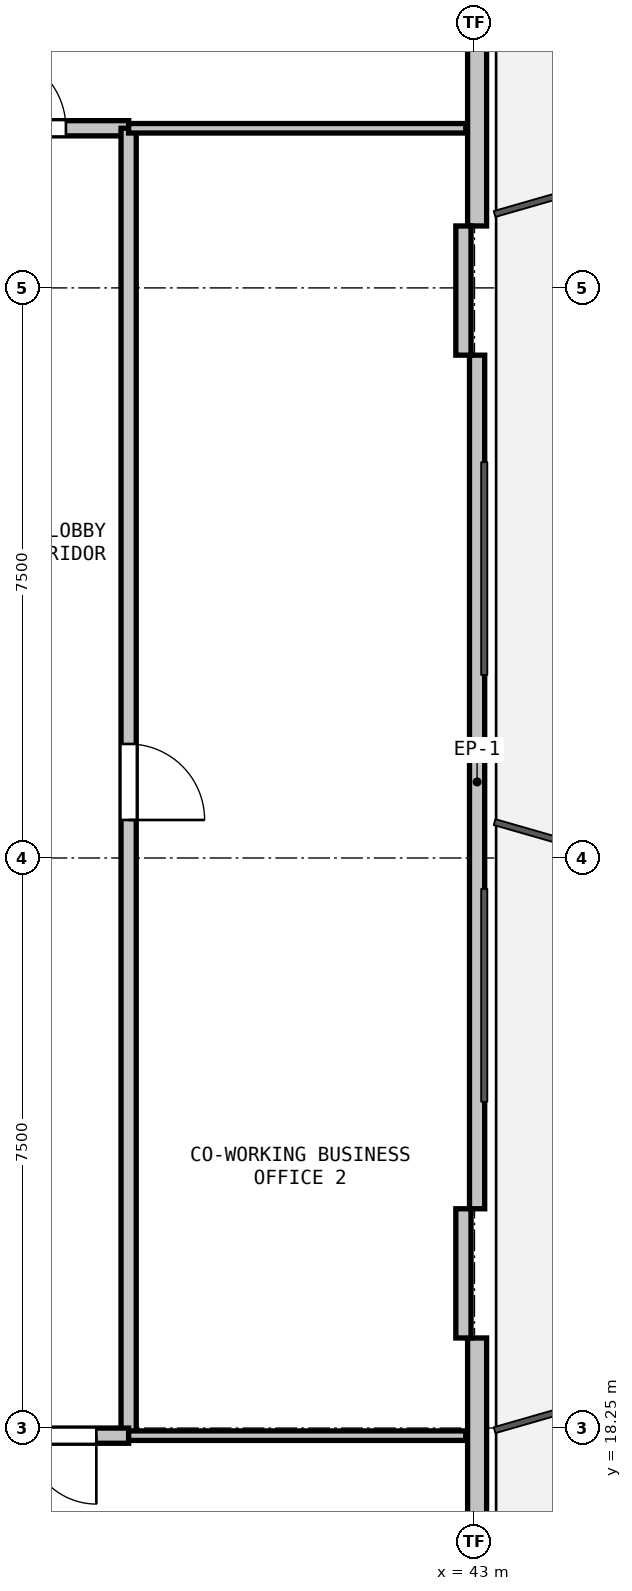
"""IFC4 building model, lengths in metres.
Left out: names, types, materials, properties, quantities, classifications, styles, units other than length and angle.
Written with IfcOpenShell. Run it as: python <this file> out.ifc"""

import sys

from ifc_helpers import new_model, si_unit, direction, frame, frame_2d, origin, place, context, subcontext, project, spatial, rectangle, extrude, element, fill, save


model = new_model("IFC4")
c1 = context("Model", 3, precision=1e-05, world=origin(), true_north=direction((0.0, 1.0)))
c2 = subcontext(c1, "Body", "Model", "MODEL_VIEW")
j1 = project(units=[si_unit("LENGTHUNIT", "METRE"), si_unit("PLANEANGLEUNIT", "RADIAN")], contexts=[c1])
p1 = place(None, origin())
s1 = spatial("IfcSite", under=j1, at=p1, CompositionType="ELEMENT")
p2 = place(p1, origin())
s2 = spatial("IfcBuilding", under=s1, at=p2, CompositionType="ELEMENT")
p3 = place(p2, frame((0.0, 0.0, 116.4)))
s3 = spatial("IfcBuildingStorey", under=s2, at=p3, CompositionType="ELEMENT", Elevation=116.4)
p4 = place(p3, frame((43.035, 45.994, 0.0), z_axis=(0.0, 0.0, 1.0), x_axis=(0.0, -1.0, 0.0)))
e1 = element("IfcWall", 1, at=p4, inside=s3, PredefinedType="SOLIDWALL", context=c2, shape_type="SweptSolid", body=[
    extrude(rectangle(XDim=11.93, YDim=0.25, at=frame_2d((5.965, 0.0))), origin(), (0.0, 0.0, 1.0), 2.945),
])
p5 = place(p4, frame((7.616, 0.0, 0.0)))
e2 = element("IfcOpeningElement", 2, at=p5, cuts=e1, PredefinedType="OPENING", context=c2, shape_type="SweptSolid", body=[
    extrude(rectangle(XDim=1.1, YDim=2.1, at=frame_2d((0.55, 1.05))), frame((0.0, 0.135, 0.0), z_axis=(0.0, -1.0, 0.0), x_axis=(1.0, 0.0, 0.0)), (0.0, 0.0, 1.0), 0.27),
])
p6 = place(p3, frame((43.035, 32.365, 0.0), z_axis=(0.0, 0.0, 1.0), x_axis=(0.0, -1.0, 0.0)))
e3 = element("IfcWall", 3, at=p6, inside=s3, PredefinedType="PARAPET", context=c2, shape_type="SweptSolid", body=[
    extrude(rectangle(XDim=11.229, YDim=0.2, at=frame_2d((5.615, 0.0))), origin(), (0.0, 0.0, 1.0), 0.2),
])
p7 = place(p3, frame((43.035, 19.435, 0.0), z_axis=(0.0, 0.0, 1.0), x_axis=(0.0, -1.0, 0.0)))
e4 = element("IfcWall", 4, at=p7, inside=s3, PredefinedType="SOLIDWALL", context=c2, shape_type="SweptSolid", body=[
    extrude(rectangle(XDim=11.93, YDim=0.25, at=frame_2d((5.965, 0.0))), origin(), (0.0, 0.0, 1.0), 2.945),
])
p8 = place(p7, frame((2.668, 0.0, 0.9)))
e5 = element("IfcOpeningElement", 5, at=p8, cuts=e4, PredefinedType="OPENING", context=c2, shape_type="SweptSolid", body=[
    extrude(rectangle(XDim=2.4, YDim=1.96, at=frame_2d((1.2, 0.98))), frame((0.0, 0.135, 0.0), z_axis=(0.0, -1.0, 0.0), x_axis=(1.0, 0.0, 0.0)), (0.0, 0.0, 1.0), 0.27),
])
for number, where, z_axis, x_axis in (
    (6, (42.854, 34.065, 0.0), (0.0, 0.0, 1.0), (0.0, -1.0, 0.0)),
    (7, (42.854, 21.135, 0.0), (0.0, 0.0, 1.0), (0.0, -1.0, 0.0)),
):
    element("IfcWall", number, at=place(p3, frame(where, z_axis=z_axis, x_axis=x_axis)), inside=s3, PredefinedType="PARAPET", context=c2, shape_type="SweptSolid", body=[
        extrude(rectangle(XDim=1.7, YDim=0.2, at=frame_2d((0.85, 0.0))), origin(), (0.0, 0.0, 1.0), 4.18),
    ])
p9 = place(p3, frame((35.8, 35.35, 0.0), z_axis=(0.0, 0.0, 1.0), x_axis=(1.0, 0.0, 0.0)))
e8 = element("IfcWall", 8, at=p9, inside=s3, PredefinedType="PARTITIONING", context=c2, shape_type="SweptSolid", body=[
    extrude(rectangle(XDim=2.65, YDim=0.2, at=frame_2d((1.325, 0.0))), origin(), (0.0, 0.0, 1.0), 2.945),
])
p10 = place(p9, frame((0.825, 0.0, 0.0)))
e9 = element("IfcOpeningElement", 9, at=p10, cuts=e8, PredefinedType="OPENING", context=c2, shape_type="SweptSolid", body=[
    extrude(rectangle(XDim=1.0, YDim=2.15, at=frame_2d((0.5, 1.075))), frame((0.0, 0.11, 0.0), z_axis=(0.0, -1.0, 0.0), x_axis=(1.0, 0.0, 0.0)), (0.0, 0.0, 1.0), 0.22),
])
p11 = place(p3, frame((38.45, 35.35, 0.0), z_axis=(0.0, 0.0, 1.0), x_axis=(0.0, -1.0, 0.0)))
e10 = element("IfcWall", 10, at=p11, inside=s3, PredefinedType="PARTITIONING", context=c2, shape_type="SweptSolid", body=[
    extrude(rectangle(XDim=17.2, YDim=0.2, at=frame_2d((8.6, 0.0))), origin(), (0.0, 0.0, 1.0), 3.195),
])
p12 = place(p11, frame((8.1, 0.0, 0.0)))
e11 = element("IfcOpeningElement", 11, at=p12, cuts=e10, PredefinedType="OPENING", context=c2, shape_type="SweptSolid", body=[
    extrude(rectangle(XDim=1.0, YDim=2.15, at=frame_2d((0.5, 1.075))), frame((0.0, 0.11, 0.0), z_axis=(0.0, -1.0, 0.0), x_axis=(1.0, 0.0, 0.0)), (0.0, 0.0, 1.0), 0.22),
])
p13 = place(p3, frame((38.45, 18.15, 0.0), z_axis=(0.0, 0.0, 1.0), x_axis=(-1.0, 0.0, 0.0)))
e12 = element("IfcWall", 12, at=p13, inside=s3, PredefinedType="PARTITIONING", context=c2, shape_type="SweptSolid", body=[
    extrude(rectangle(XDim=2.65, YDim=0.2, at=frame_2d((1.325, 0.0))), origin(), (0.0, 0.0, 1.0), 3.195),
])
p14 = place(p13, frame((0.425, 0.0, 0.0)))
e13 = element("IfcOpeningElement", 13, at=p14, cuts=e12, PredefinedType="OPENING", context=c2, shape_type="SweptSolid", body=[
    extrude(rectangle(XDim=1.8, YDim=2.2, at=frame_2d((0.9, 1.1))), frame((0.0, 0.11, 0.0), z_axis=(0.0, -1.0, 0.0), x_axis=(1.0, 0.0, 0.0)), (0.0, 0.0, 1.0), 0.22),
])
for number, where, z_axis, x_axis in (
    (14, (42.885, 35.35, 0.0), (0.0, 0.0, 1.0), (-1.0, 0.0, 0.0)),
    (15, (42.885, 18.15, 0.0), (0.0, 0.0, 1.0), (-1.0, 0.0, 0.0)),
):
    element("IfcWall", number, at=place(p3, frame(where, z_axis=z_axis, x_axis=x_axis)), inside=s3, PredefinedType="PARTITIONING", context=c2, shape_type="SweptSolid", body=[
        extrude(rectangle(XDim=4.436, YDim=0.125, at=frame_2d((2.218, 0.0))), origin(), (0.0, 0.0, 1.0), 2.365),
    ])
p15 = place(p10, origin())
e16 = element("IfcDoor", 16, at=p15, inside=s3, OperationType="SINGLE_SWING_LEFT", PredefinedType="DOOR", context=c2, shape_type="SweptSolid", body=[
    extrude(rectangle(XDim=1.0, YDim=2.15, at=frame_2d((0.5, 1.075))), frame((0.0, 0.025, 0.0), z_axis=(0.0, -1.0, 0.0), x_axis=(1.0, 0.0, 0.0)), (0.0, 0.0, 1.0), 0.05),
])
fill(e9, e16)
p16 = place(p12, origin())
e17 = element("IfcDoor", 17, at=p16, inside=s3, OperationType="SINGLE_SWING_RIGHT", PredefinedType="DOOR", context=c2, shape_type="SweptSolid", body=[
    extrude(rectangle(XDim=1.0, YDim=2.15, at=frame_2d((0.5, 1.075))), frame((0.0, 0.025, 0.0), z_axis=(0.0, -1.0, 0.0), x_axis=(1.0, 0.0, 0.0)), (0.0, 0.0, 1.0), 0.05),
])
fill(e11, e17)
p17 = place(p14, origin())
e18 = element("IfcDoor", 18, at=p17, inside=s3, OperationType="DOUBLE_DOOR_SINGLE_SWING", PredefinedType="DOOR", context=c2, shape_type="SweptSolid", body=[
    extrude(rectangle(XDim=1.8, YDim=2.2, at=frame_2d((0.9, 1.1))), frame((0.0, 0.025, 0.0), z_axis=(0.0, -1.0, 0.0), x_axis=(1.0, 0.0, 0.0)), (0.0, 0.0, 1.0), 0.05),
])
fill(e13, e18)
save(model, sys.argv[1])
